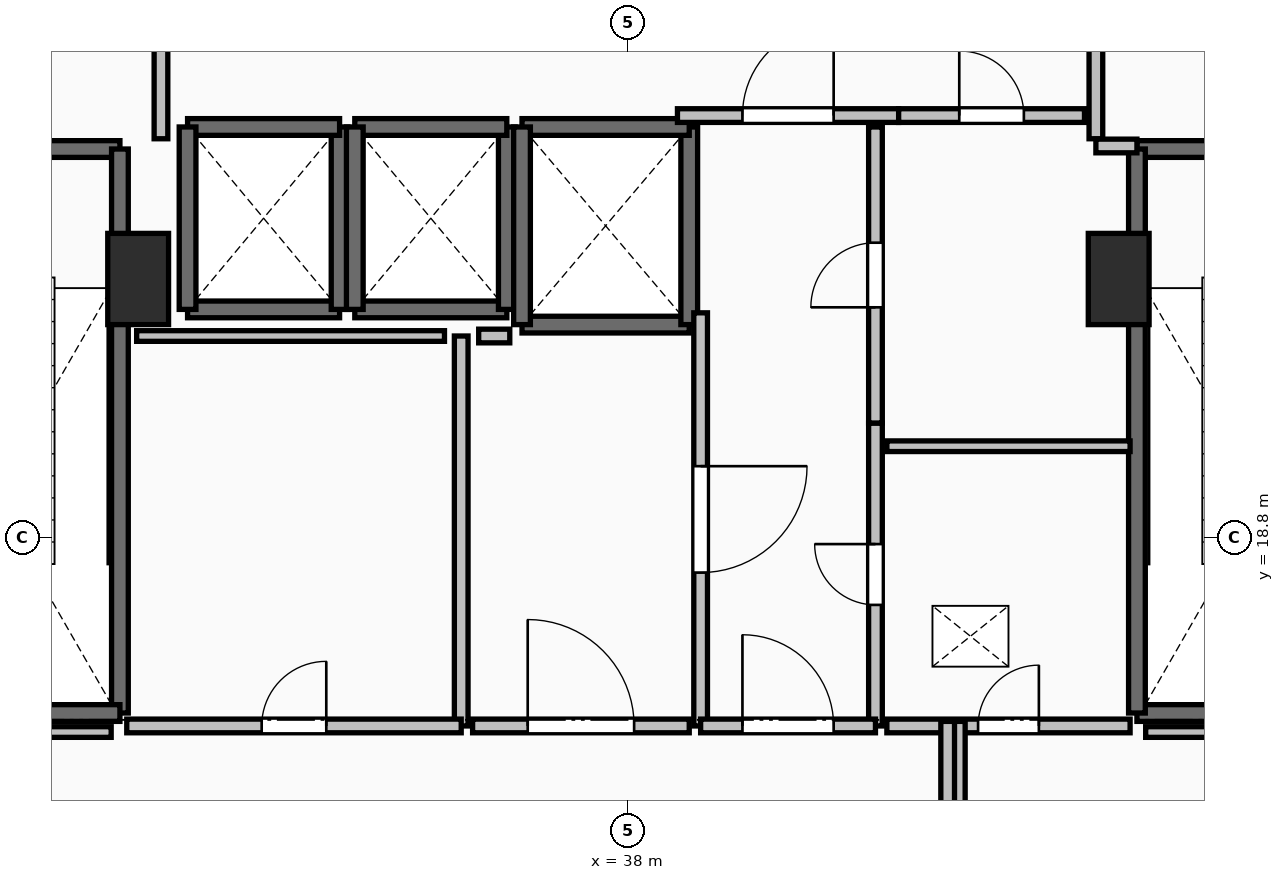
"""IFC4 building model, lengths in metres.
Left out: names, types, materials, properties, quantities, classifications, styles, units other than length and angle.
Written with IfcOpenShell. Run it as: python <this file> out.ifc"""

import sys

from ifc_helpers import new_model, si_unit, direction, frame, frame_2d, origin, origin_2d, place, context, subcontext, project, spatial, rectangle, extrude, element, fill, save


model = new_model("IFC4")
c1 = context("Model", 3, precision=1e-05, world=origin(), true_north=direction((0.0, 1.0)))
c2 = subcontext(c1, "Body", "Model", "MODEL_VIEW")
j1 = project(units=[si_unit("LENGTHUNIT", "METRE"), si_unit("PLANEANGLEUNIT", "RADIAN")], contexts=[c1])
p1 = place(None, origin())
s1 = spatial("IfcSite", under=j1, at=p1, CompositionType="ELEMENT")
p2 = place(p1, origin())
s2 = spatial("IfcBuilding", under=s1, at=p2, CompositionType="ELEMENT")
p3 = place(p2, frame((0.0, 0.0, 19.2)))
s3 = spatial("IfcBuildingStorey", under=s2, at=p3, CompositionType="ELEMENT", Elevation=19.2)
for number, where, z_axis, x_axis in (
    (1, (31.55, 22.2, 0.0), (0.0, 0.0, 1.0), (1.0, 0.0, 0.0)),
    (2, (44.45, 22.2, 0.0), (0.0, 0.0, 1.0), (1.0, 0.0, 0.0)),
):
    element("IfcColumn", number, at=place(p3, frame(where, z_axis=z_axis, x_axis=x_axis)), inside=s3, PredefinedType="PILASTER", context=c2, shape_type="SweptSolid", body=[
        extrude(rectangle(XDim=0.8, YDim=1.2, at=origin_2d()), origin(), (0.0, 0.0, 1.0), 4.8),
    ])
p4 = place(p3, frame((27.94, 23.91, 0.0), z_axis=(0.0, 0.0, 1.0), x_axis=(1.0, 0.0, 0.0)))
e3 = element("IfcWall", 3, at=p4, inside=s3, PredefinedType="SOLIDWALL", context=c2, shape_type="SweptSolid", body=[
    extrude(rectangle(XDim=3.37, YDim=0.22, at=frame_2d((1.685, 0.0))), origin(), (0.0, 0.0, 1.0), 4.54),
])
p5 = place(p4, frame((1.135, 0.0, 0.0)))
e4 = element("IfcOpeningElement", 4, at=p5, cuts=e3, PredefinedType="OPENING", context=c2, shape_type="SweptSolid", body=[
    extrude(rectangle(XDim=1.1, YDim=2.15, at=frame_2d((0.55, 1.075))), frame((0.0, 0.125, 0.0), z_axis=(0.0, -1.0, 0.0), x_axis=(1.0, 0.0, 0.0)), (0.0, 0.0, 1.0), 0.25),
])
p6 = place(p3, frame((31.31, 23.91, 0.0), z_axis=(0.0, 0.0, 1.0), x_axis=(0.0, -1.0, 0.0)))
e5 = element("IfcWall", 5, at=p6, inside=s3, PredefinedType="SOLIDWALL", context=c2, shape_type="SweptSolid", body=[
    extrude(rectangle(XDim=7.42, YDim=0.22, at=frame_2d((3.71, 0.0))), origin(), (0.0, 0.0, 1.0), 4.54),
])
p7 = place(p3, frame((31.31, 16.49, 0.0), z_axis=(0.0, 0.0, 1.0), x_axis=(-1.0, 0.0, 0.0)))
e6 = element("IfcWall", 6, at=p7, inside=s3, PredefinedType="SOLIDWALL", context=c2, shape_type="SweptSolid", body=[
    extrude(rectangle(XDim=3.37, YDim=0.22, at=frame_2d((1.685, 0.0))), origin(), (0.0, 0.0, 1.0), 4.54),
])
p8 = place(p3, frame((44.69, 23.91, 0.0), z_axis=(0.0, 0.0, 1.0), x_axis=(1.0, 0.0, 0.0)))
e7 = element("IfcWall", 7, at=p8, inside=s3, PredefinedType="SOLIDWALL", context=c2, shape_type="SweptSolid", body=[
    extrude(rectangle(XDim=3.37, YDim=0.22, at=frame_2d((1.685, 0.0))), origin(), (0.0, 0.0, 1.0), 4.54),
])
p9 = place(p8, frame((1.135, 0.0, 0.0)))
e8 = element("IfcOpeningElement", 8, at=p9, cuts=e7, PredefinedType="OPENING", context=c2, shape_type="SweptSolid", body=[
    extrude(rectangle(XDim=1.1, YDim=2.15, at=frame_2d((0.55, 1.075))), frame((0.0, 0.125, 0.0), z_axis=(0.0, -1.0, 0.0), x_axis=(1.0, 0.0, 0.0)), (0.0, 0.0, 1.0), 0.25),
])
p10 = place(p3, frame((48.06, 16.49, 0.0), z_axis=(0.0, 0.0, 1.0), x_axis=(-1.0, 0.0, 0.0)))
e9 = element("IfcWall", 9, at=p10, inside=s3, PredefinedType="SOLIDWALL", context=c2, shape_type="SweptSolid", body=[
    extrude(rectangle(XDim=3.37, YDim=0.22, at=frame_2d((1.685, 0.0))), origin(), (0.0, 0.0, 1.0), 4.54),
])
p11 = place(p3, frame((44.69, 16.49, 0.0), z_axis=(0.0, 0.0, 1.0), x_axis=(0.0, 1.0, 0.0)))
e10 = element("IfcWall", 10, at=p11, inside=s3, PredefinedType="SOLIDWALL", context=c2, shape_type="SweptSolid", body=[
    extrude(rectangle(XDim=7.42, YDim=0.22, at=frame_2d((3.71, 0.0))), origin(), (0.0, 0.0, 1.0), 4.54),
])
p12 = place(p3, frame((32.2, 21.8, 0.0), z_axis=(0.0, 0.0, 1.0), x_axis=(1.0, 0.0, 0.0)))
e11 = element("IfcWall", 11, at=p12, inside=s3, PredefinedType="SOLIDWALL", context=c2, shape_type="SweptSolid", body=[
    extrude(rectangle(XDim=2.0, YDim=0.22, at=frame_2d((1.0, 0.0))), origin(), (0.0, 0.0, 1.0), 4.54),
])
p13 = place(p3, frame((34.2, 21.8, 0.0), z_axis=(0.0, 0.0, 1.0), x_axis=(0.0, 1.0, 0.0)))
e12 = element("IfcWall", 12, at=p13, inside=s3, PredefinedType="SOLIDWALL", context=c2, shape_type="SweptSolid", body=[
    extrude(rectangle(XDim=2.4, YDim=0.22, at=frame_2d((1.2, 0.0))), origin(), (0.0, 0.0, 1.0), 4.54),
])
p14 = place(p3, frame((34.2, 24.2, 0.0), z_axis=(0.0, 0.0, 1.0), x_axis=(-1.0, 0.0, 0.0)))
e13 = element("IfcWall", 13, at=p14, inside=s3, PredefinedType="SOLIDWALL", context=c2, shape_type="SweptSolid", body=[
    extrude(rectangle(XDim=2.0, YDim=0.22, at=frame_2d((1.0, 0.0))), origin(), (0.0, 0.0, 1.0), 4.54),
])
p15 = place(p3, frame((32.2, 24.2, 0.0), z_axis=(0.0, 0.0, 1.0), x_axis=(0.0, -1.0, 0.0)))
e14 = element("IfcWall", 14, at=p15, inside=s3, PredefinedType="SOLIDWALL", context=c2, shape_type="SweptSolid", body=[
    extrude(rectangle(XDim=2.4, YDim=0.22, at=frame_2d((1.2, 0.0))), origin(), (0.0, 0.0, 1.0), 4.54),
])
p16 = place(p3, frame((34.4, 21.8, 0.0), z_axis=(0.0, 0.0, 1.0), x_axis=(1.0, 0.0, 0.0)))
e15 = element("IfcWall", 15, at=p16, inside=s3, PredefinedType="SOLIDWALL", context=c2, shape_type="SweptSolid", body=[
    extrude(rectangle(XDim=2.0, YDim=0.22, at=frame_2d((1.0, 0.0))), origin(), (0.0, 0.0, 1.0), 4.54),
])
p17 = place(p3, frame((36.4, 21.8, 0.0), z_axis=(0.0, 0.0, 1.0), x_axis=(0.0, 1.0, 0.0)))
e16 = element("IfcWall", 16, at=p17, inside=s3, PredefinedType="SOLIDWALL", context=c2, shape_type="SweptSolid", body=[
    extrude(rectangle(XDim=2.4, YDim=0.22, at=frame_2d((1.2, 0.0))), origin(), (0.0, 0.0, 1.0), 4.54),
])
p18 = place(p3, frame((36.4, 24.2, 0.0), z_axis=(0.0, 0.0, 1.0), x_axis=(-1.0, 0.0, 0.0)))
e17 = element("IfcWall", 17, at=p18, inside=s3, PredefinedType="SOLIDWALL", context=c2, shape_type="SweptSolid", body=[
    extrude(rectangle(XDim=2.0, YDim=0.22, at=frame_2d((1.0, 0.0))), origin(), (0.0, 0.0, 1.0), 4.54),
])
p19 = place(p3, frame((34.4, 24.2, 0.0), z_axis=(0.0, 0.0, 1.0), x_axis=(0.0, -1.0, 0.0)))
e18 = element("IfcWall", 18, at=p19, inside=s3, PredefinedType="SOLIDWALL", context=c2, shape_type="SweptSolid", body=[
    extrude(rectangle(XDim=2.4, YDim=0.22, at=frame_2d((1.2, 0.0))), origin(), (0.0, 0.0, 1.0), 4.54),
])
p20 = place(p3, frame((36.6, 21.6, 0.0), z_axis=(0.0, 0.0, 1.0), x_axis=(1.0, 0.0, 0.0)))
e19 = element("IfcWall", 19, at=p20, inside=s3, PredefinedType="SOLIDWALL", context=c2, shape_type="SweptSolid", body=[
    extrude(rectangle(XDim=2.2, YDim=0.22, at=frame_2d((1.1, 0.0))), origin(), (0.0, 0.0, 1.0), 4.54),
])
p21 = place(p3, frame((38.8, 21.6, 0.0), z_axis=(0.0, 0.0, 1.0), x_axis=(0.0, 1.0, 0.0)))
e20 = element("IfcWall", 20, at=p21, inside=s3, PredefinedType="SOLIDWALL", context=c2, shape_type="SweptSolid", body=[
    extrude(rectangle(XDim=2.6, YDim=0.22, at=frame_2d((1.3, 0.0))), origin(), (0.0, 0.0, 1.0), 4.54),
])
p22 = place(p3, frame((38.8, 24.2, 0.0), z_axis=(0.0, 0.0, 1.0), x_axis=(-1.0, 0.0, 0.0)))
e21 = element("IfcWall", 21, at=p22, inside=s3, PredefinedType="SOLIDWALL", context=c2, shape_type="SweptSolid", body=[
    extrude(rectangle(XDim=2.2, YDim=0.22, at=frame_2d((1.1, 0.0))), origin(), (0.0, 0.0, 1.0), 4.54),
])
p23 = place(p3, frame((36.6, 24.2, 0.0), z_axis=(0.0, 0.0, 1.0), x_axis=(0.0, -1.0, 0.0)))
e22 = element("IfcWall", 22, at=p23, inside=s3, PredefinedType="SOLIDWALL", context=c2, shape_type="SweptSolid", body=[
    extrude(rectangle(XDim=2.6, YDim=0.22, at=frame_2d((1.3, 0.0))), origin(), (0.0, 0.0, 1.0), 4.54),
])
p24 = place(p3, frame((31.85, 24.045, 0.0), z_axis=(0.0, 0.0, 1.0), x_axis=(0.0, 1.0, 0.0)))
e23 = element("IfcWall", 23, at=p24, inside=s3, PredefinedType="PARTITIONING", context=c2, shape_type="SweptSolid", body=[
    extrude(rectangle(XDim=3.91, YDim=0.18, at=frame_2d((1.955, 0.0))), origin(), (0.0, 0.0, 1.0), 4.54),
])
p25 = place(p24, frame((1.355, 0.0, 0.0)))
e24 = element("IfcOpeningElement", 24, at=p25, cuts=e23, PredefinedType="OPENING", context=c2, shape_type="SweptSolid", body=[
    extrude(rectangle(XDim=1.2, YDim=2.15, at=frame_2d((0.6, 1.075))), frame((0.0, 0.105, 0.0), z_axis=(0.0, -1.0, 0.0), x_axis=(1.0, 0.0, 0.0)), (0.0, 0.0, 1.0), 0.21),
])
p26 = place(p3, frame((44.15, 27.955, 0.0), z_axis=(0.0, 0.0, 1.0), x_axis=(0.0, -1.0, 0.0)))
e25 = element("IfcWall", 25, at=p26, inside=s3, PredefinedType="PARTITIONING", context=c2, shape_type="SweptSolid", body=[
    extrude(rectangle(XDim=3.91, YDim=0.18, at=frame_2d((1.955, 0.0))), origin(), (0.0, 0.0, 1.0), 4.54),
])
p27 = place(p26, frame((1.355, 0.0, 0.0)))
e26 = element("IfcOpeningElement", 26, at=p27, cuts=e25, PredefinedType="OPENING", context=c2, shape_type="SweptSolid", body=[
    extrude(rectangle(XDim=1.2, YDim=2.15, at=frame_2d((0.6, 1.075))), frame((0.0, 0.105, 0.0), z_axis=(0.0, -1.0, 0.0), x_axis=(1.0, 0.0, 0.0)), (0.0, 0.0, 1.0), 0.21),
])
p28 = place(p3, frame((44.15, 23.95, 0.0), z_axis=(0.0, 0.0, 1.0), x_axis=(1.0, 0.0, 0.0)))
e27 = element("IfcWall", 27, at=p28, inside=s3, PredefinedType="PARTITIONING", context=c2, shape_type="SweptSolid", body=[
    extrude(rectangle(XDim=0.54, YDim=0.18, at=frame_2d((0.27, 0.0))), origin(), (0.0, 0.0, 1.0), 4.54),
])
p29 = place(p3, frame((38.645, 24.35, 0.0), z_axis=(0.0, 0.0, 1.0), x_axis=(1.0, 0.0, 0.0)))
e28 = element("IfcWall", 28, at=p29, inside=s3, PredefinedType="PARTITIONING", context=c2, shape_type="SweptSolid", body=[
    extrude(rectangle(XDim=2.91, YDim=0.18, at=frame_2d((1.455, 0.0))), origin(), (0.0, 0.0, 1.0), 4.54),
])
p30 = place(p29, frame((0.855, 0.0, 0.0)))
e29 = element("IfcOpeningElement", 29, at=p30, cuts=e28, PredefinedType="OPENING", context=c2, shape_type="SweptSolid", body=[
    extrude(rectangle(XDim=1.2, YDim=2.15, at=frame_2d((0.6, 1.075))), frame((0.0, 0.105, 0.0), z_axis=(0.0, -1.0, 0.0), x_axis=(1.0, 0.0, 0.0)), (0.0, 0.0, 1.0), 0.21),
])
p31 = place(p3, frame((41.555, 24.35, 0.0), z_axis=(0.0, 0.0, 1.0), x_axis=(1.0, 0.0, 0.0)))
e30 = element("IfcWall", 30, at=p31, inside=s3, PredefinedType="PARTITIONING", context=c2, shape_type="SweptSolid", body=[
    extrude(rectangle(XDim=2.445, YDim=0.18, at=frame_2d((1.223, 0.0))), origin(), (0.0, 0.0, 1.0), 4.54),
])
p32 = place(p31, frame((0.798, 0.0, 0.0)))
e31 = element("IfcOpeningElement", 31, at=p32, cuts=e30, PredefinedType="OPENING", context=c2, shape_type="SweptSolid", body=[
    extrude(rectangle(XDim=0.85, YDim=2.1, at=frame_2d((0.425, 1.05))), frame((0.0, 0.105, 0.0), z_axis=(0.0, -1.0, 0.0), x_axis=(1.0, 0.0, 0.0)), (0.0, 0.0, 1.0), 0.21),
])
p33 = place(p3, frame((41.25, 16.32, 0.0), z_axis=(0.0, 0.0, 1.0), x_axis=(0.0, 1.0, 0.0)))
e32 = element("IfcWall", 32, at=p33, inside=s3, PredefinedType="PARTITIONING", context=c2, shape_type="SweptSolid", body=[
    extrude(rectangle(XDim=3.985, YDim=0.18, at=frame_2d((1.992, 0.0))), origin(), (0.0, 0.0, 1.0), 4.54),
])
p34 = place(p33, frame((1.593, 0.0, 0.0)))
e33 = element("IfcOpeningElement", 33, at=p34, cuts=e32, PredefinedType="OPENING", context=c2, shape_type="SweptSolid", body=[
    extrude(rectangle(XDim=0.8, YDim=2.05, at=frame_2d((0.4, 1.025))), frame((0.0, 0.105, 0.0), z_axis=(0.0, -1.0, 0.0), x_axis=(1.0, 0.0, 0.0)), (0.0, 0.0, 1.0), 0.21),
])
p35 = place(p3, frame((41.25, 20.305, 0.0), z_axis=(0.0, 0.0, 1.0), x_axis=(0.0, 1.0, 0.0)))
e34 = element("IfcWall", 34, at=p35, inside=s3, PredefinedType="PARTITIONING", context=c2, shape_type="SweptSolid", body=[
    extrude(rectangle(XDim=3.895, YDim=0.18, at=frame_2d((1.948, 0.0))), origin(), (0.0, 0.0, 1.0), 4.54),
])
p36 = place(p35, frame((1.522, 0.0, 0.0)))
e35 = element("IfcOpeningElement", 35, at=p36, cuts=e34, PredefinedType="OPENING", context=c2, shape_type="SweptSolid", body=[
    extrude(rectangle(XDim=0.85, YDim=2.1, at=frame_2d((0.425, 1.05))), frame((0.0, 0.105, 0.0), z_axis=(0.0, -1.0, 0.0), x_axis=(1.0, 0.0, 0.0)), (0.0, 0.0, 1.0), 0.21),
])
p37 = place(p3, frame((38.95, 21.755, 0.0), z_axis=(0.0, 0.0, 1.0), x_axis=(0.0, -1.0, 0.0)))
e36 = element("IfcWall", 36, at=p37, inside=s3, PredefinedType="PARTITIONING", context=c2, shape_type="SweptSolid", body=[
    extrude(rectangle(XDim=5.435, YDim=0.18, at=frame_2d((2.717, 0.0))), origin(), (0.0, 0.0, 1.0), 4.54),
])
p38 = place(p37, frame((2.018, 0.0, 0.0)))
e37 = element("IfcOpeningElement", 37, at=p38, cuts=e36, PredefinedType="OPENING", context=c2, shape_type="SweptSolid", body=[
    extrude(rectangle(XDim=1.4, YDim=2.2, at=frame_2d((0.7, 1.1))), frame((0.0, 0.105, 0.0), z_axis=(0.0, -1.0, 0.0), x_axis=(1.0, 0.0, 0.0)), (0.0, 0.0, 1.0), 0.21),
])
p39 = place(p3, frame((38.95, 16.32, 0.0), z_axis=(0.0, 0.0, 1.0), x_axis=(1.0, 0.0, 0.0)))
e38 = element("IfcWall", 38, at=p39, inside=s3, PredefinedType="PARTITIONING", context=c2, shape_type="SweptSolid", body=[
    extrude(rectangle(XDim=2.3, YDim=0.18, at=frame_2d((1.15, 0.0))), origin(), (0.0, 0.0, 1.0), 4.54),
])
p40 = place(p39, frame((0.55, 0.0, 0.0)))
e39 = element("IfcOpeningElement", 39, at=p40, cuts=e38, PredefinedType="OPENING", context=c2, shape_type="SweptSolid", body=[
    extrude(rectangle(XDim=1.2, YDim=2.15, at=frame_2d((0.6, 1.075))), frame((0.0, 0.105, 0.0), z_axis=(0.0, -1.0, 0.0), x_axis=(1.0, 0.0, 0.0)), (0.0, 0.0, 1.0), 0.21),
])
p41 = place(p3, frame((44.6, 20.0, 0.0), z_axis=(0.0, 0.0, 1.0), x_axis=(-1.0, 0.0, 0.0)))
e40 = element("IfcWall", 40, at=p41, inside=s3, PredefinedType="PARTITIONING", context=c2, shape_type="SweptSolid", body=[
    extrude(rectangle(XDim=3.2, YDim=0.14, at=frame_2d((1.6, 0.0))), origin(), (0.0, 0.0, 1.0), 4.54),
])
p42 = place(p3, frame((41.4, 16.32, 0.0), z_axis=(0.0, 0.0, 1.0), x_axis=(1.0, 0.0, 0.0)))
e41 = element("IfcWall", 41, at=p42, inside=s3, PredefinedType="PARTITIONING", context=c2, shape_type="SweptSolid", body=[
    extrude(rectangle(XDim=3.2, YDim=0.18, at=frame_2d((1.6, 0.0))), origin(), (0.0, 0.0, 1.0), 4.54),
])
p43 = place(p42, frame((1.2, 0.0, 0.0)))
e42 = element("IfcOpeningElement", 42, at=p43, cuts=e41, PredefinedType="OPENING", context=c2, shape_type="SweptSolid", body=[
    extrude(rectangle(XDim=0.8, YDim=2.05, at=frame_2d((0.4, 1.025))), frame((0.0, 0.105, 0.0), z_axis=(0.0, -1.0, 0.0), x_axis=(1.0, 0.0, 0.0)), (0.0, 0.0, 1.0), 0.21),
])
p44 = place(p3, frame((35.8, 16.32, 0.0), z_axis=(0.0, 0.0, 1.0), x_axis=(0.0, 1.0, 0.0)))
e43 = element("IfcWall", 43, at=p44, inside=s3, PredefinedType="PARTITIONING", context=c2, shape_type="SweptSolid", body=[
    extrude(rectangle(XDim=5.13, YDim=0.18, at=frame_2d((2.565, 0.0))), origin(), (0.0, 0.0, 1.0), 4.54),
])
p45 = place(p3, frame((31.4, 16.32, 0.0), z_axis=(0.0, 0.0, 1.0), x_axis=(1.0, 0.0, 0.0)))
e44 = element("IfcWall", 44, at=p45, inside=s3, PredefinedType="PARTITIONING", context=c2, shape_type="SweptSolid", body=[
    extrude(rectangle(XDim=4.4, YDim=0.18, at=frame_2d((2.2, 0.0))), origin(), (0.0, 0.0, 1.0), 4.54),
])
p46 = place(p45, frame((1.775, 0.0, 0.0)))
e45 = element("IfcOpeningElement", 45, at=p46, cuts=e44, PredefinedType="OPENING", context=c2, shape_type="SweptSolid", body=[
    extrude(rectangle(XDim=0.85, YDim=2.1, at=frame_2d((0.425, 1.05))), frame((0.0, 0.105, 0.0), z_axis=(0.0, -1.0, 0.0), x_axis=(1.0, 0.0, 0.0)), (0.0, 0.0, 1.0), 0.21),
])
p47 = place(p3, frame((35.95, 16.32, 0.0), z_axis=(0.0, 0.0, 1.0), x_axis=(1.0, 0.0, 0.0)))
e46 = element("IfcWall", 46, at=p47, inside=s3, PredefinedType="PARTITIONING", context=c2, shape_type="SweptSolid", body=[
    extrude(rectangle(XDim=2.85, YDim=0.18, at=frame_2d((1.425, 0.0))), origin(), (0.0, 0.0, 1.0), 4.54),
])
p48 = place(p47, frame((0.725, 0.0, 0.0)))
e47 = element("IfcOpeningElement", 47, at=p48, cuts=e46, PredefinedType="OPENING", context=c2, shape_type="SweptSolid", body=[
    extrude(rectangle(XDim=1.4, YDim=2.2, at=frame_2d((0.7, 1.1))), frame((0.0, 0.105, 0.0), z_axis=(0.0, -1.0, 0.0), x_axis=(1.0, 0.0, 0.0)), (0.0, 0.0, 1.0), 0.21),
])
for number, where, z_axis, x_axis in (
    (48, (42.34, 16.38, 0.0), (0.0, 0.0, 1.0), (0.0, -1.0, 0.0)),
    (49, (42.2, 13.96, 0.0), (0.0, 0.0, 1.0), (0.0, 1.0, 0.0)),
):
    element("IfcWall", number, at=place(p3, frame(where, z_axis=z_axis, x_axis=x_axis)), inside=s3, PredefinedType="PARTITIONING", context=c2, shape_type="SweptSolid", body=[
        extrude(rectangle(XDim=2.42, YDim=0.18, at=frame_2d((1.21, 0.0))), origin(), (0.0, 0.0, 1.0), 4.54),
    ])
p49 = place(p3, frame((35.58, 21.45, 0.0), z_axis=(0.0, 0.0, 1.0), x_axis=(-1.0, 0.0, 0.0)))
e50 = element("IfcWall", 50, at=p49, inside=s3, PredefinedType="PARTITIONING", context=c2, shape_type="SweptSolid", body=[
    extrude(rectangle(XDim=4.05, YDim=0.14, at=frame_2d((2.025, 0.0))), origin(), (0.0, 0.0, 1.0), 4.54),
])
p50 = place(p3, frame((36.439, 21.45, 0.0), z_axis=(0.0, 0.0, 1.0), x_axis=(-1.0, 0.0, 0.0)))
e51 = element("IfcWall", 51, at=p50, inside=s3, PredefinedType="PARTITIONING", context=c2, shape_type="SweptSolid", body=[
    extrude(rectangle(XDim=0.409, YDim=0.18, at=frame_2d((0.205, 0.0))), origin(), (0.0, 0.0, 1.0), 4.54),
])
for number, where, z_axis, x_axis in (
    (52, (48.55, 16.24, 0.0), (0.0, 0.0, 1.0), (-1.0, 0.0, 0.0)),
    (53, (31.195, 16.24, 0.0), (0.0, 0.0, 1.0), (-1.0, 0.0, 0.0)),
):
    element("IfcWall", number, at=place(p3, frame(where, z_axis=z_axis, x_axis=x_axis)), inside=s3, PredefinedType="PARTITIONING", context=c2, shape_type="SweptSolid", body=[
        extrude(rectangle(XDim=3.745, YDim=0.14, at=frame_2d((1.873, 0.0))), origin(), (0.0, 0.0, 1.0), 3.732),
    ])
p51 = place(p30, origin())
e54 = element("IfcDoor", 54, at=p51, inside=s3, OperationType="SINGLE_SWING_RIGHT", PredefinedType="DOOR", context=c2, shape_type="SweptSolid", body=[
    extrude(rectangle(XDim=1.2, YDim=2.15, at=frame_2d((0.6, 1.075))), frame((0.0, 0.025, 0.0), z_axis=(0.0, -1.0, 0.0), x_axis=(1.0, 0.0, 0.0)), (0.0, 0.0, 1.0), 0.05),
])
fill(e29, e54)
p52 = place(p32, origin())
e55 = element("IfcDoor", 55, at=p52, inside=s3, OperationType="SINGLE_SWING_LEFT", PredefinedType="DOOR", context=c2, shape_type="SweptSolid", body=[
    extrude(rectangle(XDim=0.85, YDim=2.1, at=frame_2d((0.425, 1.05))), frame((0.0, 0.025, 0.0), z_axis=(0.0, -1.0, 0.0), x_axis=(1.0, 0.0, 0.0)), (0.0, 0.0, 1.0), 0.05),
])
fill(e31, e55)
p53 = place(p34, origin())
e56 = element("IfcDoor", 56, at=p53, inside=s3, OperationType="SINGLE_SWING_RIGHT", PredefinedType="DOOR", context=c2, shape_type="SweptSolid", body=[
    extrude(rectangle(XDim=0.8, YDim=2.05, at=frame_2d((0.4, 1.025))), frame((0.0, 0.025, 0.0), z_axis=(0.0, -1.0, 0.0), x_axis=(1.0, 0.0, 0.0)), (0.0, 0.0, 1.0), 0.05),
])
fill(e33, e56)
p54 = place(p36, origin())
e57 = element("IfcDoor", 57, at=p54, inside=s3, OperationType="SINGLE_SWING_LEFT", PredefinedType="DOOR", context=c2, shape_type="SweptSolid", body=[
    extrude(rectangle(XDim=0.85, YDim=2.1, at=frame_2d((0.425, 1.05))), frame((0.0, 0.025, 0.0), z_axis=(0.0, -1.0, 0.0), x_axis=(1.0, 0.0, 0.0)), (0.0, 0.0, 1.0), 0.05),
])
fill(e35, e57)
p55 = place(p38, origin())
e58 = element("IfcDoor", 58, at=p55, inside=s3, OperationType="DOUBLE_SWING_LEFT", PredefinedType="DOOR", context=c2, shape_type="SweptSolid", body=[
    extrude(rectangle(XDim=1.4, YDim=2.2, at=frame_2d((0.7, 1.1))), frame((0.0, 0.025, 0.0), z_axis=(0.0, -1.0, 0.0), x_axis=(1.0, 0.0, 0.0)), (0.0, 0.0, 1.0), 0.05),
])
fill(e37, e58)
p56 = place(p40, origin())
e59 = element("IfcDoor", 59, at=p56, inside=s3, OperationType="SINGLE_SWING_LEFT", PredefinedType="DOOR", context=c2, shape_type="SweptSolid", body=[
    extrude(rectangle(XDim=1.2, YDim=2.15, at=frame_2d((0.6, 1.075))), frame((0.0, 0.025, 0.0), z_axis=(0.0, -1.0, 0.0), x_axis=(1.0, 0.0, 0.0)), (0.0, 0.0, 1.0), 0.05),
])
fill(e39, e59)
p57 = place(p43, origin())
e60 = element("IfcDoor", 60, at=p57, inside=s3, OperationType="SINGLE_SWING_RIGHT", PredefinedType="DOOR", context=c2, shape_type="SweptSolid", body=[
    extrude(rectangle(XDim=0.8, YDim=2.05, at=frame_2d((0.4, 1.025))), frame((0.0, 0.025, 0.0), z_axis=(0.0, -1.0, 0.0), x_axis=(1.0, 0.0, 0.0)), (0.0, 0.0, 1.0), 0.05),
])
fill(e42, e60)
p58 = place(p46, origin())
e61 = element("IfcDoor", 61, at=p58, inside=s3, OperationType="SINGLE_SWING_RIGHT", PredefinedType="DOOR", context=c2, shape_type="SweptSolid", body=[
    extrude(rectangle(XDim=0.85, YDim=2.1, at=frame_2d((0.425, 1.05))), frame((0.0, 0.025, 0.0), z_axis=(0.0, -1.0, 0.0), x_axis=(1.0, 0.0, 0.0)), (0.0, 0.0, 1.0), 0.05),
])
fill(e45, e61)
p59 = place(p48, origin())
e62 = element("IfcDoor", 62, at=p59, inside=s3, OperationType="DOUBLE_SWING_LEFT", PredefinedType="DOOR", context=c2, shape_type="SweptSolid", body=[
    extrude(rectangle(XDim=1.4, YDim=2.2, at=frame_2d((0.7, 1.1))), frame((0.0, 0.025, 0.0), z_axis=(0.0, -1.0, 0.0), x_axis=(1.0, 0.0, 0.0)), (0.0, 0.0, 1.0), 0.05),
])
fill(e47, e62)
save(model, sys.argv[1])
